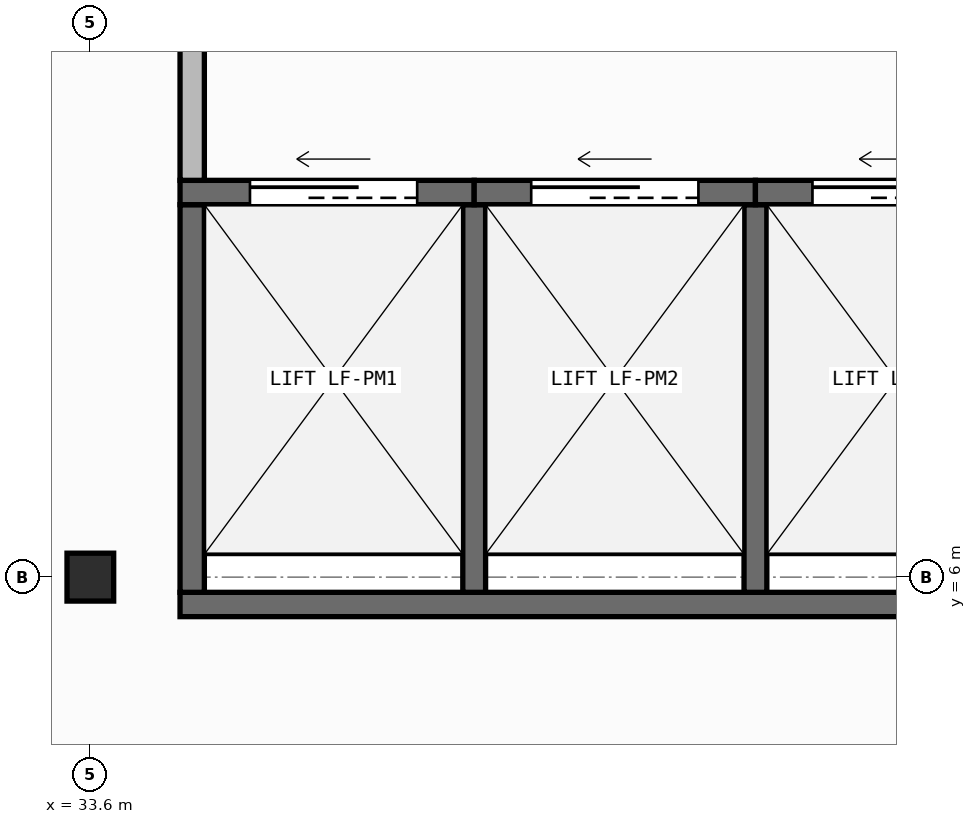
"""IFC4 building model, lengths in metres.
Left out: names, types, materials, properties, quantities, classifications, styles, units other than length and angle.
Written with IfcOpenShell. Run it as: python <this file> out.ifc"""

import sys

from ifc_helpers import new_model, si_unit, direction, frame, frame_2d, origin, origin_2d, place, context, subcontext, project, spatial, rectangle, i_section, extrude, element, fill, save


model = new_model("IFC4")
c1 = context("Model", 3, precision=1e-05, world=origin(), true_north=direction((0.0, 1.0)))
c2 = subcontext(c1, "Body", "Model", "MODEL_VIEW")
j1 = project(units=[si_unit("LENGTHUNIT", "METRE"), si_unit("PLANEANGLEUNIT", "RADIAN")], contexts=[c1])
p1 = place(None, origin())
s1 = spatial("IfcSite", under=j1, at=p1, CompositionType="ELEMENT")
p2 = place(p1, origin())
s2 = spatial("IfcBuilding", under=s1, at=p2, CompositionType="ELEMENT")
p3 = place(p2, frame((0.0, 0.0, 142.85)))
s3 = spatial("IfcBuildingStorey", under=s2, at=p3, CompositionType="ELEMENT", Elevation=142.85)
p4 = place(p3, frame((33.6, 6.0, 0.0), z_axis=(0.0, 0.0, 1.0), x_axis=(1.0, 0.0, 0.0)))
e1 = element("IfcColumn", 1, at=p4, inside=s3, PredefinedType="COLUMN", context=c2, shape_type="SweptSolid", body=[
    extrude(i_section(OverallWidth=0.307, OverallDepth=0.315, WebThickness=0.012, FlangeThickness=0.019, FilletRadius=0.017, at=origin_2d()), origin(), (0.0, 0.0, 1.0), 3.95),
])
p5 = place(p3, frame((34.19, 5.82, 0.0), z_axis=(0.0, 0.0, 1.0), x_axis=(1.0, 0.0, 0.0)))
e2 = element("IfcWall", 2, at=p5, inside=s3, PredefinedType="SHEAR", context=c2, shape_type="SweptSolid", body=[
    extrude(rectangle(XDim=5.72, YDim=0.16, at=frame_2d((2.86, 0.0))), origin(), (0.0, 0.0, 1.0), 3.71),
])
p6 = place(p3, frame((34.27, 5.9, 0.0), z_axis=(0.0, 0.0, 1.0), x_axis=(0.0, 1.0, 0.0)))
e3 = element("IfcWall", 3, at=p6, inside=s3, PredefinedType="SHEAR", context=c2, shape_type="SweptSolid", body=[
    extrude(rectangle(XDim=2.55, YDim=0.16, at=frame_2d((1.275, 0.0))), origin(), (0.0, 0.0, 1.0), 3.71),
])
for number, where, z_axis, x_axis in (
    (4, (36.125, 5.9, 0.0), (0.0, 0.0, 1.0), (0.0, 1.0, 0.0)),
    (5, (37.975, 5.9, 0.0), (0.0, 0.0, 1.0), (0.0, 1.0, 0.0)),
):
    element("IfcWall", number, at=place(p3, frame(where, z_axis=z_axis, x_axis=x_axis)), inside=s3, PredefinedType="SHEAR", context=c2, shape_type="SweptSolid", body=[
        extrude(rectangle(XDim=2.55, YDim=0.15, at=frame_2d((1.275, 0.0))), origin(), (0.0, 0.0, 1.0), 3.71),
    ])
p7 = place(p3, frame((34.19, 8.53, 0.0), z_axis=(0.0, 0.0, 1.0), x_axis=(1.0, 0.0, 0.0)))
e6 = element("IfcWall", 6, at=p7, inside=s3, PredefinedType="SHEAR", context=c2, shape_type="SweptSolid", body=[
    extrude(rectangle(XDim=1.935, YDim=0.16, at=frame_2d((0.968, 0.0))), origin(), (0.0, 0.0, 1.0), 3.71),
])
p8 = place(p7, frame((0.46, 0.0, 0.0)))
e7 = element("IfcOpeningElement", 7, at=p8, cuts=e6, PredefinedType="OPENING", context=c2, shape_type="SweptSolid", body=[
    extrude(rectangle(XDim=1.1, YDim=2.15, at=frame_2d((0.55, 1.075))), frame((0.0, 0.09, 0.0), z_axis=(0.0, -1.0, 0.0), x_axis=(1.0, 0.0, 0.0)), (0.0, 0.0, 1.0), 0.18),
])
p9 = place(p3, frame((36.125, 8.53, 0.0), z_axis=(0.0, 0.0, 1.0), x_axis=(1.0, 0.0, 0.0)))
e8 = element("IfcWall", 8, at=p9, inside=s3, PredefinedType="SHEAR", context=c2, shape_type="SweptSolid", body=[
    extrude(rectangle(XDim=1.85, YDim=0.16, at=frame_2d((0.925, 0.0))), origin(), (0.0, 0.0, 1.0), 3.71),
])
p10 = place(p9, frame((0.375, 0.0, 0.0)))
e9 = element("IfcOpeningElement", 9, at=p10, cuts=e8, PredefinedType="OPENING", context=c2, shape_type="SweptSolid", body=[
    extrude(rectangle(XDim=1.1, YDim=2.15, at=frame_2d((0.55, 1.075))), frame((0.0, 0.09, 0.0), z_axis=(0.0, -1.0, 0.0), x_axis=(1.0, 0.0, 0.0)), (0.0, 0.0, 1.0), 0.18),
])
p11 = place(p3, frame((37.975, 8.53, 0.0), z_axis=(0.0, 0.0, 1.0), x_axis=(1.0, 0.0, 0.0)))
e10 = element("IfcWall", 10, at=p11, inside=s3, PredefinedType="SHEAR", context=c2, shape_type="SweptSolid", body=[
    extrude(rectangle(XDim=1.935, YDim=0.16, at=frame_2d((0.967, 0.0))), origin(), (0.0, 0.0, 1.0), 3.71),
])
p12 = place(p11, frame((0.375, 0.0, 0.0)))
e11 = element("IfcOpeningElement", 11, at=p12, cuts=e10, PredefinedType="OPENING", context=c2, shape_type="SweptSolid", body=[
    extrude(rectangle(XDim=1.1, YDim=2.15, at=frame_2d((0.55, 1.075))), frame((0.0, 0.09, 0.0), z_axis=(0.0, -1.0, 0.0), x_axis=(1.0, 0.0, 0.0)), (0.0, 0.0, 1.0), 0.18),
])
p13 = place(p3, frame((34.27, 8.61, 0.0), z_axis=(0.0, 0.0, 1.0), x_axis=(0.0, 1.0, 0.0)))
e12 = element("IfcWall", 12, at=p13, inside=s3, PredefinedType="PARTITIONING", context=c2, shape_type="SweptSolid", body=[
    extrude(rectangle(XDim=3.39, YDim=0.16, at=frame_2d((1.695, 0.0))), origin(), (0.0, 0.0, 1.0), 3.71),
])
p14 = place(p8, origin())
e13 = element("IfcDoor", 13, at=p14, inside=s3, OperationType="SLIDING_TO_LEFT", PredefinedType="DOOR", context=c2, shape_type="SweptSolid", body=[
    extrude(rectangle(XDim=1.1, YDim=2.15, at=frame_2d((0.55, 1.075))), frame((0.0, 0.025, 0.0), z_axis=(0.0, -1.0, 0.0), x_axis=(1.0, 0.0, 0.0)), (0.0, 0.0, 1.0), 0.05),
])
fill(e7, e13)
p15 = place(p10, origin())
e14 = element("IfcDoor", 14, at=p15, inside=s3, OperationType="SLIDING_TO_LEFT", PredefinedType="DOOR", context=c2, shape_type="SweptSolid", body=[
    extrude(rectangle(XDim=1.1, YDim=2.15, at=frame_2d((0.55, 1.075))), frame((0.0, 0.025, 0.0), z_axis=(0.0, -1.0, 0.0), x_axis=(1.0, 0.0, 0.0)), (0.0, 0.0, 1.0), 0.05),
])
fill(e9, e14)
p16 = place(p12, origin())
e15 = element("IfcDoor", 15, at=p16, inside=s3, OperationType="SLIDING_TO_LEFT", PredefinedType="DOOR", context=c2, shape_type="SweptSolid", body=[
    extrude(rectangle(XDim=1.1, YDim=2.15, at=frame_2d((0.55, 1.075))), frame((0.0, 0.025, 0.0), z_axis=(0.0, -1.0, 0.0), x_axis=(1.0, 0.0, 0.0)), (0.0, 0.0, 1.0), 0.05),
])
fill(e11, e15)
save(model, sys.argv[1])
